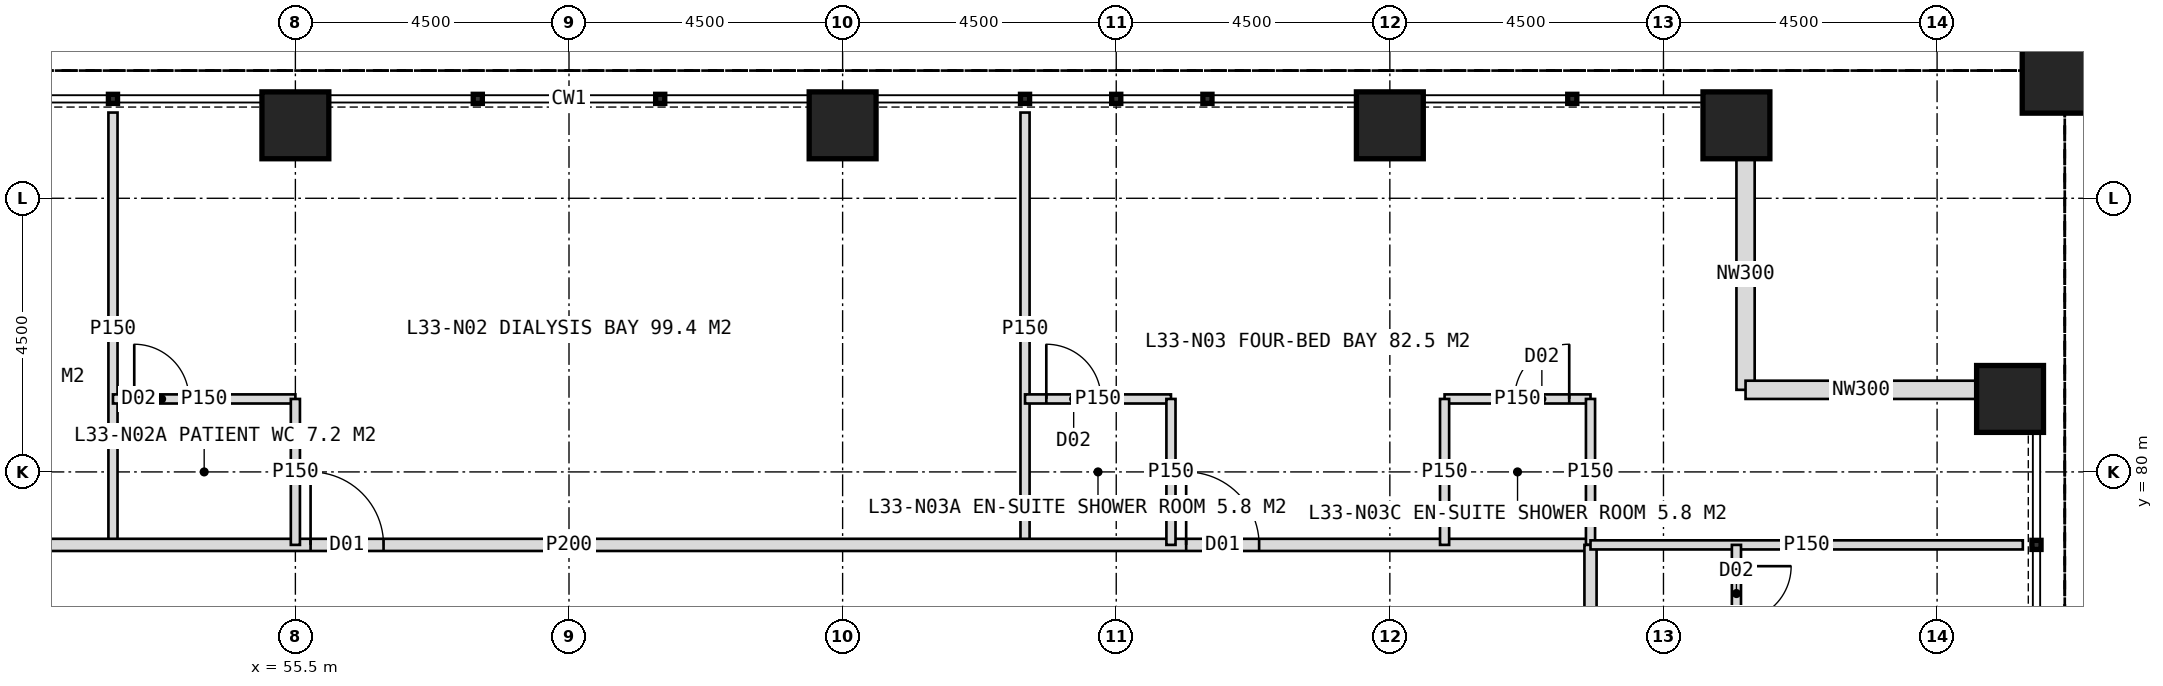
"""IFC4 building model, lengths in metres.
Left out: names, types, materials, properties, quantities, classifications, styles, units other than length and angle.
Written with IfcOpenShell. Run it as: python <this file> out.ifc"""

import sys

from ifc_helpers import new_model, si_unit, direction, frame, frame_2d, origin, origin_2d, place, context, subcontext, project, spatial, rectangle, hollow_rectangle, extrude, element, fill, save


model = new_model("IFC4")
c1 = context("Model", 3, precision=1e-05, world=origin(), true_north=direction((0.0, 1.0)))
c2 = subcontext(c1, "Body", "Model", "MODEL_VIEW")
j1 = project(units=[si_unit("LENGTHUNIT", "METRE"), si_unit("PLANEANGLEUNIT", "RADIAN")], contexts=[c1])
p1 = place(None, origin())
s1 = spatial("IfcSite", under=j1, at=p1, CompositionType="ELEMENT")
p2 = place(p1, origin())
s2 = spatial("IfcBuilding", under=s1, at=p2, CompositionType="ELEMENT")
p3 = place(p2, frame((0.0, 0.0, 140.0)))
s3 = spatial("IfcBuildingStorey", under=s2, at=p3, CompositionType="ELEMENT", Elevation=140.0)
for number, where, z_axis, x_axis in (
    (1, (55.5, 85.7, 0.0), (0.0, 0.0, 1.0), (1.0, 0.0, 0.0)),
    (2, (64.5, 85.7, 0.0), (0.0, 0.0, 1.0), (1.0, 0.0, 0.0)),
    (3, (73.5, 85.7, 0.0), (0.0, 0.0, 1.0), (1.0, 0.0, 0.0)),
    (4, (79.2, 85.7, 0.0), (0.0, 0.0, 1.0), (1.0, 0.0, 0.0)),
    (5, (83.7, 81.2, 0.0), (0.0, 0.0, 1.0), (1.0, 0.0, 0.0)),
):
    element("IfcColumn", number, at=place(p3, frame(where, z_axis=z_axis, x_axis=x_axis)), inside=s3, PredefinedType="COLUMN", context=c2, shape_type="SweptSolid", body=[
        extrude(hollow_rectangle(XDim=1.1, YDim=1.1, WallThickness=0.1, at=origin_2d()), origin(), (0.0, 0.0, 1.0), 4.0),
    ])
p4 = place(p3, frame((84.6, 86.6, 0.0), z_axis=(0.0, 0.0, 1.0), x_axis=(1.0, 0.0, 0.0)))
e6 = element("IfcColumn", 6, at=p4, inside=s3, PredefinedType="COLUMN", context=c2, shape_type="SweptSolid", body=[
    extrude(hollow_rectangle(XDim=1.4, YDim=1.4, WallThickness=0.08, at=origin_2d()), origin(), (0.0, 0.0, 1.0), 4.0),
])
for number, where, z_axis, x_axis in (
    (7, (79.35, 85.15, 0.0), (0.0, 0.0, 1.0), (0.0, -1.0, 0.0)),
    (8, (79.35, 81.35, 0.0), (0.0, 0.0, 1.0), (1.0, 0.0, 0.0)),
):
    element("IfcWall", number, at=place(p3, frame(where, z_axis=z_axis, x_axis=x_axis)), inside=s3, PredefinedType="ELEMENTEDWALL", context=c2, shape_type="SweptSolid", body=[
        extrude(rectangle(XDim=3.8, YDim=0.3, at=frame_2d((1.9, 0.0))), origin(), (0.0, 0.0, 1.0), 4.0),
    ])
for number, where, z_axis, x_axis in (
    (9, (52.5, 78.8, 0.0), (0.0, 0.0, 1.0), (0.0, 1.0, 0.0)),
    (10, (67.5, 78.8, 0.0), (0.0, 0.0, 1.0), (0.0, 1.0, 0.0)),
):
    element("IfcWall", number, at=place(p3, frame(where, z_axis=z_axis, x_axis=x_axis)), inside=s3, PredefinedType="PARTITIONING", context=c2, shape_type="SweptSolid", body=[
        extrude(rectangle(XDim=7.11, YDim=0.15, at=frame_2d((3.555, 0.0))), origin(), (0.0, 0.0, 1.0), 3.75),
    ])
p5 = place(p3, frame((43.2, 78.8, 0.0), z_axis=(0.0, 0.0, 1.0), x_axis=(1.0, 0.0, 0.0)))
e11 = element("IfcWall", 11, at=p5, inside=s3, PredefinedType="PARTITIONING", context=c2, shape_type="SweptSolid", body=[
    extrude(rectangle(XDim=33.6, YDim=0.2, at=frame_2d((16.8, 0.0))), origin(), (0.0, 0.0, 1.0), 3.75),
])
p6 = place(p5, frame((3.25, 0.0, 0.0)))
e12 = element("IfcOpeningElement", 12, at=p6, cuts=e11, PredefinedType="OPENING", context=c2, shape_type="SweptSolid", body=[
    extrude(rectangle(XDim=1.2, YDim=2.2, at=frame_2d((0.6, 1.1))), frame((0.0, 0.11, 0.0), z_axis=(0.0, -1.0, 0.0), x_axis=(1.0, 0.0, 0.0)), (0.0, 0.0, 1.0), 0.22),
])
p7 = place(p5, frame((12.55, 0.0, 0.0)))
e13 = element("IfcOpeningElement", 13, at=p7, cuts=e11, PredefinedType="OPENING", context=c2, shape_type="SweptSolid", body=[
    extrude(rectangle(XDim=1.2, YDim=2.2, at=frame_2d((0.6, 1.1))), frame((0.0, 0.11, 0.0), z_axis=(0.0, -1.0, 0.0), x_axis=(1.0, 0.0, 0.0)), (0.0, 0.0, 1.0), 0.22),
])
p8 = place(p5, frame((26.95, 0.0, 0.0)))
e14 = element("IfcOpeningElement", 14, at=p8, cuts=e11, PredefinedType="OPENING", context=c2, shape_type="SweptSolid", body=[
    extrude(rectangle(XDim=1.2, YDim=2.2, at=frame_2d((0.6, 1.1))), frame((0.0, 0.11, 0.0), z_axis=(0.0, -1.0, 0.0), x_axis=(1.0, 0.0, 0.0)), (0.0, 0.0, 1.0), 0.22),
])
p9 = place(p3, frame((52.5, 81.2, 0.0), z_axis=(0.0, 0.0, 1.0), x_axis=(1.0, 0.0, 0.0)))
e15 = element("IfcWall", 15, at=p9, inside=s3, PredefinedType="PARTITIONING", context=c2, shape_type="SweptSolid", body=[
    extrude(rectangle(XDim=3.0, YDim=0.15, at=frame_2d((1.5, 0.0))), origin(), (0.0, 0.0, 1.0), 3.75),
])
p10 = place(p9, frame((0.35, 0.0, 0.0)))
e16 = element("IfcOpeningElement", 16, at=p10, cuts=e15, PredefinedType="OPENING", context=c2, shape_type="SweptSolid", body=[
    extrude(rectangle(XDim=0.9, YDim=2.1, at=frame_2d((0.45, 1.05))), frame((0.0, 0.085, 0.0), z_axis=(0.0, -1.0, 0.0), x_axis=(1.0, 0.0, 0.0)), (0.0, 0.0, 1.0), 0.17),
])
p11 = place(p3, frame((55.5, 78.8, 0.0), z_axis=(0.0, 0.0, 1.0), x_axis=(0.0, 1.0, 0.0)))
e17 = element("IfcWall", 17, at=p11, inside=s3, PredefinedType="PARTITIONING", context=c2, shape_type="SweptSolid", body=[
    extrude(rectangle(XDim=2.4, YDim=0.15, at=frame_2d((1.2, 0.0))), origin(), (0.0, 0.0, 1.0), 2.95),
])
p12 = place(p3, frame((67.5, 81.2, 0.0), z_axis=(0.0, 0.0, 1.0), x_axis=(1.0, 0.0, 0.0)))
e18 = element("IfcWall", 18, at=p12, inside=s3, PredefinedType="PARTITIONING", context=c2, shape_type="SweptSolid", body=[
    extrude(rectangle(XDim=2.4, YDim=0.15, at=frame_2d((1.2, 0.0))), origin(), (0.0, 0.0, 1.0), 3.75),
])
p13 = place(p12, frame((0.35, 0.0, 0.0)))
e19 = element("IfcOpeningElement", 19, at=p13, cuts=e18, PredefinedType="OPENING", context=c2, shape_type="SweptSolid", body=[
    extrude(rectangle(XDim=0.9, YDim=2.1, at=frame_2d((0.45, 1.05))), frame((0.0, 0.085, 0.0), z_axis=(0.0, -1.0, 0.0), x_axis=(1.0, 0.0, 0.0)), (0.0, 0.0, 1.0), 0.17),
])
p14 = place(p3, frame((69.9, 78.8, 0.0), z_axis=(0.0, 0.0, 1.0), x_axis=(0.0, 1.0, 0.0)))
e20 = element("IfcWall", 20, at=p14, inside=s3, PredefinedType="PARTITIONING", context=c2, shape_type="SweptSolid", body=[
    extrude(rectangle(XDim=2.4, YDim=0.15, at=frame_2d((1.2, 0.0))), origin(), (0.0, 0.0, 1.0), 3.75),
])
p15 = place(p3, frame((74.4, 81.2, 0.0), z_axis=(0.0, 0.0, 1.0), x_axis=(1.0, 0.0, 0.0)))
e21 = element("IfcWall", 21, at=p15, inside=s3, PredefinedType="PARTITIONING", context=c2, shape_type="SweptSolid", body=[
    extrude(rectangle(XDim=2.4, YDim=0.15, at=frame_2d((1.2, 0.0))), origin(), (0.0, 0.0, 1.0), 2.997),
])
p16 = place(p15, frame((1.15, 0.0, 0.0)))
e22 = element("IfcOpeningElement", 22, at=p16, cuts=e21, PredefinedType="OPENING", context=c2, shape_type="SweptSolid", body=[
    extrude(rectangle(XDim=0.9, YDim=2.1, at=frame_2d((0.45, 1.05))), frame((0.0, 0.085, 0.0), z_axis=(0.0, -1.0, 0.0), x_axis=(1.0, 0.0, 0.0)), (0.0, 0.0, 1.0), 0.17),
])
for number, where, z_axis, x_axis in (
    (23, (74.4, 78.8, 0.0), (0.0, 0.0, 1.0), (0.0, 1.0, 0.0)),
    (24, (76.8, 78.8, 0.0), (0.0, 0.0, 1.0), (0.0, 1.0, 0.0)),
):
    element("IfcWall", number, at=place(p3, frame(where, z_axis=z_axis, x_axis=x_axis)), inside=s3, PredefinedType="PARTITIONING", context=c2, shape_type="SweptSolid", body=[
        extrude(rectangle(XDim=2.4, YDim=0.15, at=frame_2d((1.2, 0.0))), origin(), (0.0, 0.0, 1.0), 3.75),
    ])
p17 = place(p3, frame((76.8, 78.8, 0.0), z_axis=(0.0, 0.0, 1.0), x_axis=(0.0, -1.0, 0.0)))
e25 = element("IfcWall", 25, at=p17, inside=s3, PredefinedType="PARTITIONING", context=c2, shape_type="SweptSolid", body=[
    extrude(rectangle(XDim=33.6, YDim=0.2, at=frame_2d((16.8, 0.0))), origin(), (0.0, 0.0, 1.0), 3.75),
])
p18 = place(p17, frame((2.65, 0.0, 0.0)))
e26 = element("IfcOpeningElement", 26, at=p18, cuts=e25, PredefinedType="OPENING", context=c2, shape_type="SweptSolid", body=[
    extrude(rectangle(XDim=1.2, YDim=2.2, at=frame_2d((0.6, 1.1))), frame((0.0, 0.11, 0.0), z_axis=(0.0, -1.0, 0.0), x_axis=(1.0, 0.0, 0.0)), (0.0, 0.0, 1.0), 0.22),
])
p19 = place(p17, frame((8.95, 0.0, 0.0)))
e27 = element("IfcOpeningElement", 27, at=p19, cuts=e25, PredefinedType="OPENING", context=c2, shape_type="SweptSolid", body=[
    extrude(rectangle(XDim=1.2, YDim=2.2, at=frame_2d((0.6, 1.1))), frame((0.0, 0.11, 0.0), z_axis=(0.0, -1.0, 0.0), x_axis=(1.0, 0.0, 0.0)), (0.0, 0.0, 1.0), 0.22),
])
p20 = place(p17, frame((19.45, 0.0, 0.0)))
e28 = element("IfcOpeningElement", 28, at=p20, cuts=e25, PredefinedType="OPENING", context=c2, shape_type="SweptSolid", body=[
    extrude(rectangle(XDim=1.2, YDim=2.2, at=frame_2d((0.6, 1.1))), frame((0.0, 0.11, 0.0), z_axis=(0.0, -1.0, 0.0), x_axis=(1.0, 0.0, 0.0)), (0.0, 0.0, 1.0), 0.22),
])
p21 = place(p17, frame((28.45, 0.0, 0.0)))
e29 = element("IfcOpeningElement", 29, at=p21, cuts=e25, PredefinedType="OPENING", context=c2, shape_type="SweptSolid", body=[
    extrude(rectangle(XDim=1.2, YDim=2.2, at=frame_2d((0.6, 1.1))), frame((0.0, 0.11, 0.0), z_axis=(0.0, -1.0, 0.0), x_axis=(1.0, 0.0, 0.0)), (0.0, 0.0, 1.0), 0.22),
])
p22 = place(p3, frame((76.8, 78.8, 0.0), z_axis=(0.0, 0.0, 1.0), x_axis=(1.0, 0.0, 0.0)))
e30 = element("IfcWall", 30, at=p22, inside=s3, PredefinedType="PARTITIONING", context=c2, shape_type="SweptSolid", body=[
    extrude(rectangle(XDim=7.11, YDim=0.15, at=frame_2d((3.555, 0.0))), origin(), (0.0, 0.0, 1.0), 3.75),
])
p23 = place(p3, frame((79.2, 78.8, 0.0), z_axis=(0.0, 0.0, 1.0), x_axis=(0.0, -1.0, 0.0)))
e31 = element("IfcWall", 31, at=p23, inside=s3, PredefinedType="PARTITIONING", context=c2, shape_type="SweptSolid", body=[
    extrude(rectangle(XDim=2.4, YDim=0.15, at=frame_2d((1.2, 0.0))), origin(), (0.0, 0.0, 1.0), 2.997),
])
p24 = place(p23, frame((0.35, 0.0, 0.0)))
e32 = element("IfcOpeningElement", 32, at=p24, cuts=e31, PredefinedType="OPENING", context=c2, shape_type="SweptSolid", body=[
    extrude(rectangle(XDim=0.9, YDim=2.1, at=frame_2d((0.45, 1.05))), frame((0.0, 0.085, 0.0), z_axis=(0.0, -1.0, 0.0), x_axis=(1.0, 0.0, 0.0)), (0.0, 0.0, 1.0), 0.17),
])
p25 = place(p7, origin())
e33 = element("IfcDoor", 33, at=p25, inside=s3, OperationType="SINGLE_SWING_LEFT", PredefinedType="DOOR", context=c2, shape_type="SweptSolid", body=[
    extrude(rectangle(XDim=1.2, YDim=2.2, at=frame_2d((0.6, 1.1))), frame((0.0, 0.025, 0.0), z_axis=(0.0, -1.0, 0.0), x_axis=(1.0, 0.0, 0.0)), (0.0, 0.0, 1.0), 0.05),
])
fill(e13, e33)
p26 = place(p10, origin())
e34 = element("IfcDoor", 34, at=p26, inside=s3, OperationType="SINGLE_SWING_LEFT", PredefinedType="DOOR", context=c2, shape_type="SweptSolid", body=[
    extrude(rectangle(XDim=0.9, YDim=2.1, at=frame_2d((0.45, 1.05))), frame((0.0, 0.025, 0.0), z_axis=(0.0, -1.0, 0.0), x_axis=(1.0, 0.0, 0.0)), (0.0, 0.0, 1.0), 0.05),
])
fill(e16, e34)
p27 = place(p8, origin())
e35 = element("IfcDoor", 35, at=p27, inside=s3, OperationType="SINGLE_SWING_LEFT", PredefinedType="DOOR", context=c2, shape_type="SweptSolid", body=[
    extrude(rectangle(XDim=1.2, YDim=2.2, at=frame_2d((0.6, 1.1))), frame((0.0, 0.025, 0.0), z_axis=(0.0, -1.0, 0.0), x_axis=(1.0, 0.0, 0.0)), (0.0, 0.0, 1.0), 0.05),
])
fill(e14, e35)
p28 = place(p13, origin())
e36 = element("IfcDoor", 36, at=p28, inside=s3, OperationType="SINGLE_SWING_LEFT", PredefinedType="DOOR", context=c2, shape_type="SweptSolid", body=[
    extrude(rectangle(XDim=0.9, YDim=2.1, at=frame_2d((0.45, 1.05))), frame((0.0, 0.025, 0.0), z_axis=(0.0, -1.0, 0.0), x_axis=(1.0, 0.0, 0.0)), (0.0, 0.0, 1.0), 0.05),
])
fill(e19, e36)
p29 = place(p16, origin())
e37 = element("IfcDoor", 37, at=p29, inside=s3, OperationType="SINGLE_SWING_RIGHT", PredefinedType="DOOR", context=c2, shape_type="SweptSolid", body=[
    extrude(rectangle(XDim=0.9, YDim=2.1, at=frame_2d((0.45, 1.05))), frame((0.0, 0.025, 0.0), z_axis=(0.0, -1.0, 0.0), x_axis=(1.0, 0.0, 0.0)), (0.0, 0.0, 1.0), 0.05),
])
fill(e22, e37)
p30 = place(p24, origin())
e38 = element("IfcDoor", 38, at=p30, inside=s3, OperationType="SINGLE_SWING_LEFT", PredefinedType="DOOR", context=c2, shape_type="SweptSolid", body=[
    extrude(rectangle(XDim=0.9, YDim=2.1, at=frame_2d((0.45, 1.05))), frame((0.0, 0.025, 0.0), z_axis=(0.0, -1.0, 0.0), x_axis=(1.0, 0.0, 0.0)), (0.0, 0.0, 1.0), 0.05),
])
fill(e32, e38)
save(model, sys.argv[1])
